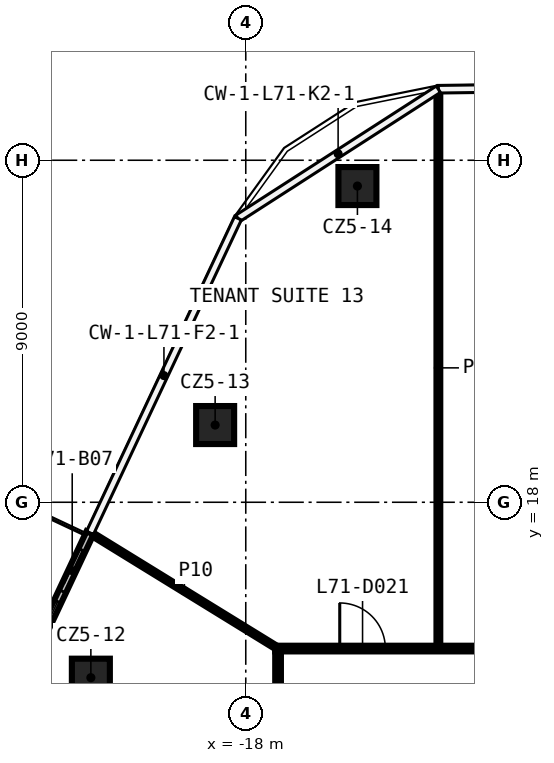
"""IFC4 building model, lengths in metres.
Left out: names, types, materials, properties, quantities, classifications, styles, units other than length and angle.
Written with IfcOpenShell. Run it as: python <this file> out.ifc"""

import sys

from ifc_helpers import new_model, si_unit, direction, frame, frame_2d, origin, origin_2d, place, context, subcontext, project, spatial, rectangle, extrude, element, fill, save


model = new_model("IFC4")
c1 = context("Model", 3, precision=1e-05, world=origin(), true_north=direction((0.0, 1.0)))
c2 = subcontext(c1, "Body", "Model", "MODEL_VIEW")
j1 = project(units=[si_unit("LENGTHUNIT", "METRE"), si_unit("PLANEANGLEUNIT", "RADIAN")], contexts=[c1])
p1 = place(None, origin())
s1 = spatial("IfcSite", under=j1, at=p1, CompositionType="ELEMENT")
p2 = place(p1, origin())
s2 = spatial("IfcBuilding", under=s1, at=p2, CompositionType="ELEMENT")
p3 = place(p2, frame((0.0, 0.0, 332.0)))
s3 = spatial("IfcBuildingStorey", under=s2, at=p3, CompositionType="ELEMENT", Elevation=332.0)
for number, where, z_axis, x_axis in (
    (1, (-22.076, 13.384, 0.0), (0.0, 0.0, 1.0), (1.0, 0.0, 0.0)),
    (2, (-18.806, 20.032, 0.0), (0.0, 0.0, 1.0), (1.0, 0.0, 0.0)),
    (3, (-15.062, 26.321, 0.0), (0.0, 0.0, 1.0), (1.0, 0.0, 0.0)),
):
    element("IfcColumn", number, at=place(p3, frame(where, z_axis=z_axis, x_axis=x_axis)), inside=s3, PredefinedType="COLUMN", context=c2, shape_type="SweptSolid", body=[
        extrude(rectangle(XDim=1.0, YDim=1.0, at=origin_2d()), origin(), (0.0, 0.0, 1.0), 3.82),
    ])
p4 = place(p3, frame((-17.225, 14.15, 0.0), z_axis=(0.0, 0.0, 1.0), x_axis=(1.0, 0.0, 0.0)))
e4 = element("IfcWall", 4, at=p4, inside=s3, PredefinedType="PARTITIONING", context=c2, shape_type="SweptSolid", body=[
    extrude(rectangle(XDim=34.45, YDim=0.15, at=frame_2d((17.225, 0.0))), origin(), (0.0, 0.0, 1.0), 3.82),
])
p5 = place(p4, frame((24.708, 0.0, 0.0)))
e5 = element("IfcOpeningElement", 5, at=p5, cuts=e4, PredefinedType="OPENING", context=c2, shape_type="SweptSolid", body=[
    extrude(rectangle(XDim=1.2, YDim=2.1, at=frame_2d((0.6, 1.05))), frame((0.0, 0.085, 0.0), z_axis=(0.0, -1.0, 0.0), x_axis=(1.0, 0.0, 0.0)), (0.0, 0.0, 1.0), 0.17),
])
p6 = place(p4, frame((20.038, 0.0, 0.0)))
e6 = element("IfcOpeningElement", 6, at=p6, cuts=e4, PredefinedType="OPENING", context=c2, shape_type="SweptSolid", body=[
    extrude(rectangle(XDim=1.2, YDim=2.1, at=frame_2d((0.6, 1.05))), frame((0.0, 0.085, 0.0), z_axis=(0.0, -1.0, 0.0), x_axis=(1.0, 0.0, 0.0)), (0.0, 0.0, 1.0), 0.17),
])
p7 = place(p4, frame((15.367, 0.0, 0.0)))
e7 = element("IfcOpeningElement", 7, at=p7, cuts=e4, PredefinedType="OPENING", context=c2, shape_type="SweptSolid", body=[
    extrude(rectangle(XDim=1.2, YDim=2.1, at=frame_2d((0.6, 1.05))), frame((0.0, 0.085, 0.0), z_axis=(0.0, -1.0, 0.0), x_axis=(1.0, 0.0, 0.0)), (0.0, 0.0, 1.0), 0.17),
])
p8 = place(p4, frame((10.695, 0.0, 0.0)))
e8 = element("IfcOpeningElement", 8, at=p8, cuts=e4, PredefinedType="OPENING", context=c2, shape_type="SweptSolid", body=[
    extrude(rectangle(XDim=1.2, YDim=2.1, at=frame_2d((0.6, 1.05))), frame((0.0, 0.085, 0.0), z_axis=(0.0, -1.0, 0.0), x_axis=(1.0, 0.0, 0.0)), (0.0, 0.0, 1.0), 0.17),
])
p9 = place(p4, frame((6.025, 0.0, 0.0)))
e9 = element("IfcOpeningElement", 9, at=p9, cuts=e4, PredefinedType="OPENING", context=c2, shape_type="SweptSolid", body=[
    extrude(rectangle(XDim=1.2, YDim=2.1, at=frame_2d((0.6, 1.05))), frame((0.0, 0.085, 0.0), z_axis=(0.0, -1.0, 0.0), x_axis=(1.0, 0.0, 0.0)), (0.0, 0.0, 1.0), 0.17),
])
p10 = place(p4, frame((1.698, 0.0, 0.0)))
e10 = element("IfcOpeningElement", 10, at=p10, cuts=e4, PredefinedType="OPENING", context=c2, shape_type="SweptSolid", body=[
    extrude(rectangle(XDim=1.2, YDim=2.1, at=frame_2d((0.6, 1.05))), frame((0.0, 0.085, 0.0), z_axis=(0.0, -1.0, 0.0), x_axis=(1.0, 0.0, 0.0)), (0.0, 0.0, 1.0), 0.17),
])
p11 = place(p3, frame((-12.932, 14.225, 0.0), z_axis=(0.0, 0.0, 1.0), x_axis=(0.0, 1.0, 0.0)))
e11 = element("IfcWall", 11, at=p11, inside=s3, PredefinedType="PARTITIONING", context=c2, shape_type="SweptSolid", body=[
    extrude(rectangle(XDim=14.624, YDim=0.1, at=frame_2d((7.312, 0.0))), origin(), (0.0, 0.0, 1.0), 3.82),
])
p12 = place(p3, frame((-17.15, -14.075, 0.0), z_axis=(0.0, 0.0, 1.0), x_axis=(0.0, 1.0, 0.0)))
e12 = element("IfcWall", 12, at=p12, inside=s3, PredefinedType="PARTITIONING", context=c2, shape_type="SweptSolid", body=[
    extrude(rectangle(XDim=28.15, YDim=0.15, at=frame_2d((14.075, 0.0))), origin(), (0.0, 0.0, 1.0), 3.82),
])
p13 = place(p12, frame((11.122, 0.0, 0.0)))
e13 = element("IfcOpeningElement", 13, at=p13, cuts=e12, PredefinedType="OPENING", context=c2, shape_type="SweptSolid", body=[
    extrude(rectangle(XDim=1.2, YDim=2.1, at=frame_2d((0.6, 1.05))), frame((0.0, 0.085, 0.0), z_axis=(0.0, -1.0, 0.0), x_axis=(1.0, 0.0, 0.0)), (0.0, 0.0, 1.0), 0.17),
])
p14 = place(p12, frame((5.555, 0.0, 0.0)))
e14 = element("IfcOpeningElement", 14, at=p14, cuts=e12, PredefinedType="OPENING", context=c2, shape_type="SweptSolid", body=[
    extrude(rectangle(XDim=1.2, YDim=2.1, at=frame_2d((0.6, 1.05))), frame((0.0, 0.085, 0.0), z_axis=(0.0, -1.0, 0.0), x_axis=(1.0, 0.0, 0.0)), (0.0, 0.0, 1.0), 0.17),
])
p15 = place(p12, frame((1.7, 0.0, 0.0)))
e15 = element("IfcOpeningElement", 15, at=p15, cuts=e12, PredefinedType="OPENING", context=c2, shape_type="SweptSolid", body=[
    extrude(rectangle(XDim=1.2, YDim=2.1, at=frame_2d((0.6, 1.05))), frame((0.0, 0.085, 0.0), z_axis=(0.0, -1.0, 0.0), x_axis=(1.0, 0.0, 0.0)), (0.0, 0.0, 1.0), 0.17),
])
p16 = place(p12, frame((24.457, 0.0, 0.0)))
e16 = element("IfcOpeningElement", 16, at=p16, cuts=e12, PredefinedType="OPENING", context=c2, shape_type="SweptSolid", body=[
    extrude(rectangle(XDim=1.2, YDim=2.1, at=frame_2d((0.6, 1.05))), frame((0.0, 0.085, 0.0), z_axis=(0.0, -1.0, 0.0), x_axis=(1.0, 0.0, 0.0)), (0.0, 0.0, 1.0), 0.17),
])
p17 = place(p12, frame((20.314, 0.0, 0.0)))
e17 = element("IfcOpeningElement", 17, at=p17, cuts=e12, PredefinedType="OPENING", context=c2, shape_type="SweptSolid", body=[
    extrude(rectangle(XDim=1.2, YDim=2.1, at=frame_2d((0.6, 1.05))), frame((0.0, 0.085, 0.0), z_axis=(0.0, -1.0, 0.0), x_axis=(1.0, 0.0, 0.0)), (0.0, 0.0, 1.0), 0.17),
])
p18 = place(p12, frame((16.172, 0.0, 0.0)))
e18 = element("IfcOpeningElement", 18, at=p18, cuts=e12, PredefinedType="OPENING", context=c2, shape_type="SweptSolid", body=[
    extrude(rectangle(XDim=1.2, YDim=2.1, at=frame_2d((0.6, 1.05))), frame((0.0, 0.085, 0.0), z_axis=(0.0, -1.0, 0.0), x_axis=(1.0, 0.0, 0.0)), (0.0, 0.0, 1.0), 0.17),
])
p19 = place(p3, frame((-22.081, 17.185, 0.0), z_axis=(0.0, 0.0, 1.0), x_axis=(0.85162357217, -0.524153881341, 0.0)))
e19 = element("IfcWall", 19, at=p19, inside=s3, PredefinedType="PARTITIONING", context=c2, shape_type="SweptSolid", body=[
    extrude(rectangle(XDim=5.791, YDim=0.1, at=frame_2d((2.895, 0.0))), origin(), (0.0, 0.0, 1.0), 3.82),
])
p20 = place(p3, frame((-22.099, 17.195, 0.0), z_axis=(0.0, 0.0, 1.0), x_axis=(-0.425492631057, -0.904961889206, 0.0)))
e20 = element("IfcWall", 20, at=p20, inside=s3, PredefinedType="SOLIDWALL", context=c2, shape_type="SweptSolid", body=[
    extrude(rectangle(XDim=18.309, YDim=0.2, at=frame_2d((9.155, 0.0))), origin(), (0.0, 0.0, 1.0), 3.82),
])
p21 = place(p20, frame((2.0, 0.0, 0.6)))
e21 = element("IfcOpeningElement", 21, at=p21, cuts=e20, PredefinedType="OPENING", context=c2, shape_type="SweptSolid", body=[
    extrude(rectangle(XDim=1.6, YDim=2.4, at=frame_2d((0.8, 1.2))), frame((0.0, 0.11, 0.0), z_axis=(0.0, -1.0, 0.0), x_axis=(1.0, 0.0, 0.0)), (0.0, 0.0, 1.0), 0.22),
])
p22 = place(p20, frame((0.5, 0.0, 0.0)))
e22 = element("IfcOpeningElement", 22, at=p22, cuts=e20, PredefinedType="OPENING", context=c2, shape_type="SweptSolid", body=[
    extrude(rectangle(XDim=1.2, YDim=2.4, at=frame_2d((0.6, 1.2))), frame((0.0, 0.11, 0.0), z_axis=(0.0, -1.0, 0.0), x_axis=(1.0, 0.0, 0.0)), (0.0, 0.0, 1.0), 0.22),
])
p23 = place(p20, frame((6.577, 0.0, 0.6)))
e23 = element("IfcOpeningElement", 23, at=p23, cuts=e20, PredefinedType="OPENING", context=c2, shape_type="SweptSolid", body=[
    extrude(rectangle(XDim=1.6, YDim=2.4, at=frame_2d((0.8, 1.2))), frame((0.0, 0.11, 0.0), z_axis=(0.0, -1.0, 0.0), x_axis=(1.0, 0.0, 0.0)), (0.0, 0.0, 1.0), 0.22),
])
p24 = place(p20, frame((5.077, 0.0, 0.0)))
e24 = element("IfcOpeningElement", 24, at=p24, cuts=e20, PredefinedType="OPENING", context=c2, shape_type="SweptSolid", body=[
    extrude(rectangle(XDim=1.2, YDim=2.4, at=frame_2d((0.6, 1.2))), frame((0.0, 0.11, 0.0), z_axis=(0.0, -1.0, 0.0), x_axis=(1.0, 0.0, 0.0)), (0.0, 0.0, 1.0), 0.22),
])
p25 = place(p20, frame((9.655, 0.0, 0.6)))
e25 = element("IfcOpeningElement", 25, at=p25, cuts=e20, PredefinedType="OPENING", context=c2, shape_type="SweptSolid", body=[
    extrude(rectangle(XDim=1.6, YDim=2.4, at=frame_2d((0.8, 1.2))), frame((0.0, 0.11, 0.0), z_axis=(0.0, -1.0, 0.0), x_axis=(1.0, 0.0, 0.0)), (0.0, 0.0, 1.0), 0.22),
])
p26 = place(p20, frame((11.655, 0.0, 0.0)))
e26 = element("IfcOpeningElement", 26, at=p26, cuts=e20, PredefinedType="OPENING", context=c2, shape_type="SweptSolid", body=[
    extrude(rectangle(XDim=1.2, YDim=2.4, at=frame_2d((0.6, 1.2))), frame((0.0, 0.11, 0.0), z_axis=(0.0, -1.0, 0.0), x_axis=(1.0, 0.0, 0.0)), (0.0, 0.0, 1.0), 0.22),
])
p27 = place(p20, frame((15.732, 0.0, 0.6)))
e27 = element("IfcOpeningElement", 27, at=p27, cuts=e20, PredefinedType="OPENING", context=c2, shape_type="SweptSolid", body=[
    extrude(rectangle(XDim=1.6, YDim=2.4, at=frame_2d((0.8, 1.2))), frame((0.0, 0.11, 0.0), z_axis=(0.0, -1.0, 0.0), x_axis=(1.0, 0.0, 0.0)), (0.0, 0.0, 1.0), 0.22),
])
p28 = place(p20, frame((14.232, 0.0, 0.0)))
e28 = element("IfcOpeningElement", 28, at=p28, cuts=e20, PredefinedType="OPENING", context=c2, shape_type="SweptSolid", body=[
    extrude(rectangle(XDim=1.2, YDim=2.4, at=frame_2d((0.6, 1.2))), frame((0.0, 0.11, 0.0), z_axis=(0.0, -1.0, 0.0), x_axis=(1.0, 0.0, 0.0)), (0.0, 0.0, 1.0), 0.22),
])
p29 = place(p10, origin())
e29 = element("IfcDoor", 29, at=p29, inside=s3, OperationType="SINGLE_SWING_RIGHT", PredefinedType="DOOR", context=c2, shape_type="SweptSolid", body=[
    extrude(rectangle(XDim=1.2, YDim=2.1, at=frame_2d((0.6, 1.05))), frame((0.0, 0.025, 0.0), z_axis=(0.0, -1.0, 0.0), x_axis=(1.0, 0.0, 0.0)), (0.0, 0.0, 1.0), 0.05),
])
fill(e10, e29)
p30 = place(p21, origin())
e30 = element("IfcWindow", 30, at=p30, inside=s3, PartitioningType="SINGLE_PANEL", PredefinedType="WINDOW", context=c2, shape_type="SweptSolid", body=[
    extrude(rectangle(XDim=1.6, YDim=2.4, at=frame_2d((0.8, 1.2))), frame((0.0, 0.03, 0.0), z_axis=(0.0, -1.0, 0.0), x_axis=(1.0, 0.0, 0.0)), (0.0, 0.0, 1.0), 0.06),
])
fill(e21, e30)
p31 = place(p22, origin())
e31 = element("IfcDoor", 31, at=p31, inside=s3, OperationType="SLIDING_TO_LEFT", PredefinedType="DOOR", context=c2, shape_type="SweptSolid", body=[
    extrude(rectangle(XDim=1.2, YDim=2.4, at=frame_2d((0.6, 1.2))), frame((0.0, 0.025, 0.0), z_axis=(0.0, -1.0, 0.0), x_axis=(1.0, 0.0, 0.0)), (0.0, 0.0, 1.0), 0.05),
])
fill(e22, e31)
save(model, sys.argv[1])
